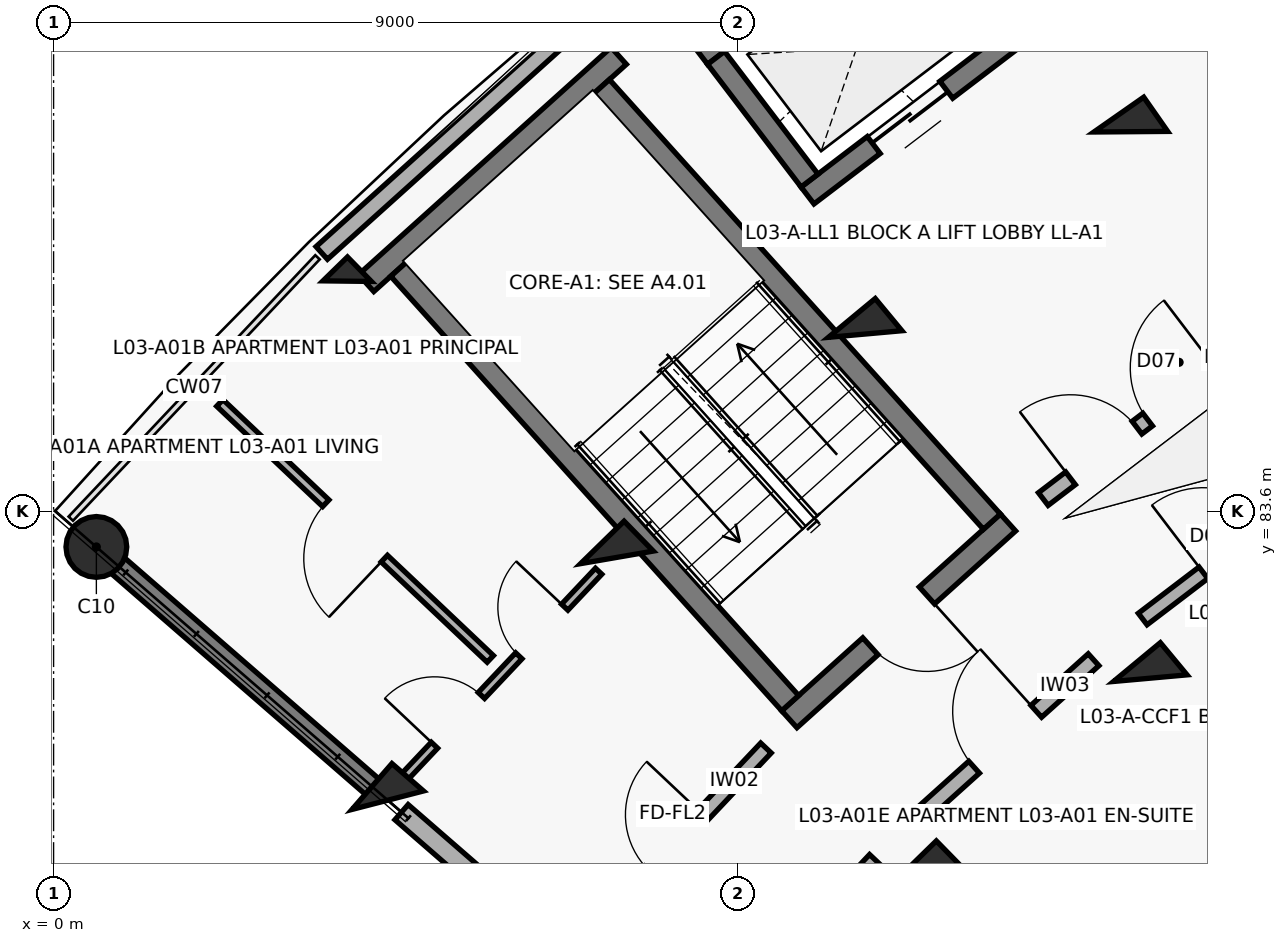
"""IFC4 building model, lengths in metres.
Left out: names, types, materials, properties, quantities, classifications, styles, units other than length and angle.
Written with IfcOpenShell. Run it as: python <this file> out.ifc"""

import sys

from ifc_helpers import new_model, si_unit, direction, frame, frame_2d, origin, origin_2d, place, context, subcontext, project, spatial, rectangle, circle, extrude, element, fill, save


model = new_model("IFC4")
c1 = context("Model", 3, precision=1e-05, world=origin(), true_north=direction((0.0, 1.0)))
c2 = subcontext(c1, "Body", "Model", "MODEL_VIEW")
j1 = project(units=[si_unit("LENGTHUNIT", "METRE"), si_unit("PLANEANGLEUNIT", "RADIAN")], contexts=[c1])
p1 = place(None, origin())
s1 = spatial("IfcSite", under=j1, at=p1, CompositionType="ELEMENT")
p2 = place(p1, origin())
s2 = spatial("IfcBuilding", under=s1, at=p2, CompositionType="ELEMENT")
p3 = place(p2, frame((0.0, 0.0, 11.2)))
s3 = spatial("IfcBuildingStorey", under=s2, at=p3, CompositionType="ELEMENT", Elevation=11.2)
p4 = place(p3, frame((4.397, 79.796, 0.0), z_axis=(0.0, 0.0, 1.0), x_axis=(-0.754709580223, 0.656059028991, 0.0)))
e1 = element("IfcColumn", 1, at=p4, inside=s3, PredefinedType="COLUMN", context=c2, shape_type="SweptSolid", body=[
    extrude(rectangle(XDim=0.55, YDim=0.8, at=origin_2d()), origin(), (0.0, 0.0, 1.0), 3.1),
])
p5 = place(p3, frame((0.563, 83.129, 0.0), z_axis=(0.0, 0.0, 1.0), x_axis=(-0.754709580223, 0.656059028991, 0.0)))
e2 = element("IfcColumn", 2, at=p5, inside=s3, PredefinedType="COLUMN", context=c2, shape_type="SweptSolid", body=[
    extrude(circle(Radius=0.4, at=origin_2d()), origin(), (0.0, 0.0, 1.0), 3.1),
])
for number, where, z_axis, x_axis in (
    (3, (11.52, 78.784, 0.0), (0.0, 0.0, 1.0), (-0.699, 0.715, 0.0)),
    (4, (7.412, 82.991, 0.0), (0.0, 0.0, 1.0), (-0.699, 0.715, 0.0)),
):
    element("IfcColumn", number, at=place(p3, frame(where, z_axis=z_axis, x_axis=x_axis)), inside=s3, PredefinedType="COLUMN", context=c2, shape_type="SweptSolid", body=[
        extrude(rectangle(XDim=0.55, YDim=0.8, at=origin_2d()), origin(), (0.0, 0.0, 1.0), 3.1),
    ])
p6 = place(p3, frame((3.863, 86.626, 0.0), z_axis=(0.0, 0.0, 1.0), x_axis=(-0.698665066769, 0.715448897181, 0.0)))
e5 = element("IfcColumn", 5, at=p6, inside=s3, PredefinedType="COLUMN", context=c2, shape_type="SweptSolid", body=[
    extrude(rectangle(XDim=0.45, YDim=0.45, at=origin_2d()), origin(), (0.0, 0.0, 1.0), 3.1),
])
for number, where, z_axis, x_axis in (
    (6, (14.429, 81.402, 0.0), (0.0, 0.0, 1.0), (-0.638, 0.77, 0.0)),
    (7, (10.678, 85.93, 0.0), (0.0, 0.0, 1.0), (-0.638, 0.77, 0.0)),
):
    element("IfcColumn", number, at=place(p3, frame(where, z_axis=z_axis, x_axis=x_axis)), inside=s3, PredefinedType="COLUMN", context=c2, shape_type="SweptSolid", body=[
        extrude(rectangle(XDim=0.55, YDim=0.8, at=origin_2d()), origin(), (0.0, 0.0, 1.0), 3.1),
    ])
p7 = place(p3, frame((7.437, 89.842, 0.0), z_axis=(0.0, 0.0, 1.0), x_axis=(-0.637961754089, 0.770068049148, 0.0)))
e8 = element("IfcColumn", 8, at=p7, inside=s3, PredefinedType="COLUMN", context=c2, shape_type="SweptSolid", body=[
    extrude(rectangle(XDim=0.5, YDim=0.75, at=origin_2d()), origin(), (0.0, 0.0, 1.0), 3.1),
])
p8 = place(p3, frame((14.172, 88.592, 0.0), z_axis=(0.0, 0.0, 1.0), x_axis=(-0.573004420611, 0.819552276527, 0.0)))
e9 = element("IfcColumn", 9, at=p8, inside=s3, PredefinedType="COLUMN", context=c2, shape_type="SweptSolid", body=[
    extrude(rectangle(XDim=0.55, YDim=0.8, at=origin_2d()), origin(), (0.0, 0.0, 1.0), 3.1),
])
p9 = place(p3, frame((4.261, 79.914, 0.0), z_axis=(0.0, 0.0, 1.0), x_axis=(-0.754703505217, 0.65606601742, 0.0)))
e10 = element("IfcWall", 10, at=p9, inside=s3, PredefinedType="SHEAR", context=c2, shape_type="SweptSolid", body=[
    extrude(rectangle(XDim=4.72, YDim=0.27, at=frame_2d((2.36, 0.0))), origin(), (0.0, 0.0, 1.0), 2.86),
])
p10 = place(p3, frame((3.528, 86.997, 0.0), z_axis=(0.0, 0.0, 1.0), x_axis=(0.743387539862, 0.668860946369, 0.0)))
e11 = element("IfcWall", 11, at=p10, inside=s3, PredefinedType="SOLIDWALL", context=c2, shape_type="SweptSolid", body=[
    extrude(rectangle(XDim=4.809, YDim=0.224, at=frame_2d((2.405, 0.0))), origin(), (0.0, 0.0, 1.0), 2.25),
])
p11 = place(p3, frame((10.766, 74.259, 0.0), z_axis=(0.0, 0.0, 1.0), x_axis=(-0.754717680958, 0.656049710044, 0.0)))
e12 = element("IfcWall", 12, at=p11, inside=s3, PredefinedType="SOLIDWALL", context=c2, shape_type="SweptSolid", body=[
    extrude(rectangle(XDim=8.2, YDim=0.265, at=frame_2d((4.1, 0.0))), origin(), (0.0, 0.0, 1.0), 2.08),
])
p12 = place(p11, frame((3.59, 0.0, 0.75)))
e13 = element("IfcOpeningElement", 13, at=p12, cuts=e12, PredefinedType="OPENING", context=c2, shape_type="SweptSolid", body=[
    extrude(rectangle(XDim=1.35, YDim=1.35, at=frame_2d((0.675, 0.675))), frame((0.0, 0.142, 0.0), z_axis=(0.0, -1.0, 0.0), x_axis=(1.0, 0.0, 0.0)), (0.0, 0.0, 1.0), 0.285),
])
p13 = place(p3, frame((12.557, 83.45, 0.0), z_axis=(0.0, 0.0, 1.0), x_axis=(-0.743375696158, -0.668874109501, 0.0)))
e14 = element("IfcWall", 14, at=p13, inside=s3, PredefinedType="SHEAR", context=c2, shape_type="SweptSolid", body=[
    extrude(rectangle(XDim=3.87, YDim=0.3, at=frame_2d((1.935, 0.0))), origin(), (0.0, 0.0, 1.0), 3.1),
])
p14 = place(p13, frame((1.435, 0.0, 0.0)))
e15 = element("IfcOpeningElement", 15, at=p14, cuts=e14, PredefinedType="OPENING", context=c2, shape_type="SweptSolid", body=[
    extrude(rectangle(XDim=1.0, YDim=2.15, at=frame_2d((0.5, 1.075))), frame((0.0, 0.16, 0.0), z_axis=(0.0, -1.0, 0.0), x_axis=(1.0, 0.0, 0.0)), (0.0, 0.0, 1.0), 0.32),
])
p15 = place(p3, frame((7.436, 89.59, 0.0), z_axis=(0.0, 0.0, 1.0), x_axis=(-0.743400052815, -0.668847038922, 0.0)))
e16 = element("IfcWall", 16, at=p15, inside=s3, PredefinedType="SHEAR", context=c2, shape_type="SweptSolid", body=[
    extrude(rectangle(XDim=4.47, YDim=0.3, at=frame_2d((2.235, 0.0))), origin(), (0.0, 0.0, 1.0), 3.1),
])
p16 = place(p3, frame((12.345, 83.461, 0.0), z_axis=(0.0, 0.0, 1.0), x_axis=(-0.668868253964, 0.743380964808, 0.0)))
e17 = element("IfcWall", 17, at=p16, inside=s3, PredefinedType="SHEAR", context=c2, shape_type="SweptSolid", body=[
    extrude(rectangle(XDim=7.69, YDim=0.3, at=frame_2d((3.845, 0.0))), origin(), (0.0, 0.0, 1.0), 3.1),
])
p17 = place(p3, frame((9.691, 81.073, 0.0), z_axis=(0.0, 0.0, 1.0), x_axis=(-0.668885797871, 0.743365179038, 0.0)))
e18 = element("IfcWall", 18, at=p17, inside=s3, PredefinedType="SHEAR", context=c2, shape_type="SweptSolid", body=[
    extrude(rectangle(XDim=7.69, YDim=0.3, at=frame_2d((3.845, 0.0))), origin(), (0.0, 0.0, 1.0), 3.1),
])
p18 = place(p3, frame((12.616, 89.807, 0.0), z_axis=(0.0, 0.0, 1.0), x_axis=(-0.795474703455, -0.605986795371, 0.0)))
e19 = element("IfcWall", 19, at=p18, inside=s3, PredefinedType="SHEAR", context=c2, shape_type="SweptSolid", body=[
    extrude(rectangle(XDim=3.39, YDim=0.28, at=frame_2d((1.695, 0.0))), origin(), (0.0, 0.0, 1.0), 3.1),
])
p19 = place(p18, frame((1.095, 0.0, 0.0)))
e20 = element("IfcOpeningElement", 20, at=p19, cuts=e19, PredefinedType="OPENING", context=c2, shape_type="SweptSolid", body=[
    extrude(rectangle(XDim=1.2, YDim=2.15, at=frame_2d((0.6, 1.075))), frame((0.0, 0.15, 0.0), z_axis=(0.0, -1.0, 0.0), x_axis=(1.0, 0.0, 0.0)), (0.0, 0.0, 1.0), 0.3),
])
p20 = place(p3, frame((11.216, 91.645, 0.0), z_axis=(0.0, 0.0, 1.0), x_axis=(-0.795439986025, -0.606032365994, 0.0)))
e21 = element("IfcWall", 21, at=p20, inside=s3, PredefinedType="SHEAR", context=c2, shape_type="SweptSolid", body=[
    extrude(rectangle(XDim=3.39, YDim=0.28, at=frame_2d((1.695, 0.0))), origin(), (0.0, 0.0, 1.0), 3.1),
])
p21 = place(p3, frame((9.946, 87.949, 0.0), z_axis=(0.0, 0.0, 1.0), x_axis=(-0.605891019062, 0.795547656033, 0.0)))
e22 = element("IfcWall", 22, at=p21, inside=s3, PredefinedType="SHEAR", context=c2, shape_type="SweptSolid", body=[
    extrude(rectangle(XDim=2.03, YDim=0.28, at=frame_2d((1.015, 0.0))), origin(), (0.0, 0.0, 1.0), 3.1),
])
p22 = place(p3, frame((7.014, 77.984, 0.0), z_axis=(0.0, 0.0, 1.0), x_axis=(0.686310507227, 0.727308660522, 0.0)))
e23 = element("IfcWall", 23, at=p22, inside=s3, PredefinedType="SOLIDWALL", context=c2, shape_type="SweptSolid", body=[
    extrude(rectangle(XDim=3.436, YDim=0.19, at=frame_2d((1.718, 0.0))), origin(), (0.0, 0.0, 1.0), 2.08),
])
p23 = place(p22, frame((1.208, 0.0, 0.0)))
e24 = element("IfcOpeningElement", 24, at=p23, cuts=e23, PredefinedType="OPENING", context=c2, shape_type="SweptSolid", body=[
    extrude(rectangle(XDim=1.02, YDim=2.15, at=frame_2d((0.51, 1.075))), frame((0.0, 0.105, 0.0), z_axis=(0.0, -1.0, 0.0), x_axis=(1.0, 0.0, 0.0)), (0.0, 0.0, 1.0), 0.21),
])
p24 = place(p3, frame((8.561, 76.639, 0.0), z_axis=(0.0, 0.0, 1.0), x_axis=(0.686307658735, 0.727311348434, 0.0)))
e25 = element("IfcWall", 25, at=p24, inside=s3, PredefinedType="SOLIDWALL", context=c2, shape_type="SweptSolid", body=[
    extrude(rectangle(XDim=3.269, YDim=0.19, at=frame_2d((1.634, 0.0))), origin(), (0.0, 0.0, 1.0), 2.08),
])
p25 = place(p24, frame((1.154, 0.0, 0.0)))
e26 = element("IfcOpeningElement", 26, at=p25, cuts=e25, PredefinedType="OPENING", context=c2, shape_type="SweptSolid", body=[
    extrude(rectangle(XDim=0.96, YDim=2.1, at=frame_2d((0.48, 1.05))), frame((0.0, 0.105, 0.0), z_axis=(0.0, -1.0, 0.0), x_axis=(1.0, 0.0, 0.0)), (0.0, 0.0, 1.0), 0.21),
])
p26 = place(p3, frame((4.565, 80.047, 0.0), z_axis=(0.0, 0.0, 1.0), x_axis=(0.686300649561, 0.727317962388, 0.0)))
e27 = element("IfcWall", 27, at=p26, inside=s3, PredefinedType="PARTITIONING", context=c2, shape_type="SweptSolid", body=[
    extrude(rectangle(XDim=3.797, YDim=0.115, at=frame_2d((1.899, 0.0))), origin(), (0.0, 0.0, 1.0), 2.08),
])
p27 = place(p26, frame((0.65, 0.0, 0.0)))
e28 = element("IfcOpeningElement", 28, at=p27, cuts=e27, PredefinedType="OPENING", context=c2, shape_type="SweptSolid", body=[
    extrude(rectangle(XDim=0.9, YDim=2.1, at=frame_2d((0.45, 1.05))), frame((0.0, 0.067, 0.0), z_axis=(0.0, -1.0, 0.0), x_axis=(1.0, 0.0, 0.0)), (0.0, 0.0, 1.0), 0.135),
])
p28 = place(p26, frame((2.267, 0.0, 0.0)))
e29 = element("IfcOpeningElement", 29, at=p28, cuts=e27, PredefinedType="OPENING", context=c2, shape_type="SweptSolid", body=[
    extrude(rectangle(XDim=0.88, YDim=2.1, at=frame_2d((0.44, 1.05))), frame((0.0, 0.067, 0.0), z_axis=(0.0, -1.0, 0.0), x_axis=(1.0, 0.0, 0.0)), (0.0, 0.0, 1.0), 0.135),
])
p29 = place(p3, frame((5.746, 81.655, 0.0), z_axis=(0.0, 0.0, 1.0), x_axis=(-0.726295620759, 0.687382478149, 0.0)))
e30 = element("IfcWall", 30, at=p29, inside=s3, PredefinedType="PARTITIONING", context=c2, shape_type="SweptSolid", body=[
    extrude(rectangle(XDim=4.9, YDim=0.12, at=frame_2d((2.45, 0.0))), origin(), (0.0, 0.0, 1.0), 2.08),
])
p30 = place(p29, frame((1.92, 0.0, 0.0)))
e31 = element("IfcOpeningElement", 31, at=p30, cuts=e30, PredefinedType="OPENING", context=c2, shape_type="SweptSolid", body=[
    extrude(rectangle(XDim=1.06, YDim=2.1, at=frame_2d((0.53, 1.05))), frame((0.0, 0.07, 0.0), z_axis=(0.0, -1.0, 0.0), x_axis=(1.0, 0.0, 0.0)), (0.0, 0.0, 1.0), 0.14),
])
p31 = place(p3, frame((11.357, 79.552, 0.0), z_axis=(0.0, 0.0, 1.0), x_axis=(0.743387266925, 0.668861249718, 0.0)))
e32 = element("IfcWall", 32, at=p31, inside=s3, PredefinedType="SOLIDWALL", context=c2, shape_type="SweptSolid", body=[
    extrude(rectangle(XDim=3.128, YDim=0.21, at=frame_2d((1.564, 0.0))), origin(), (0.0, 0.0, 1.0), 2.08),
])
p32 = place(p31, frame((1.014, 0.0, 0.0)))
e33 = element("IfcOpeningElement", 33, at=p32, cuts=e32, PredefinedType="OPENING", context=c2, shape_type="SweptSolid", body=[
    extrude(rectangle(XDim=1.1, YDim=2.15, at=frame_2d((0.55, 1.075))), frame((0.0, 0.115, 0.0), z_axis=(0.0, -1.0, 0.0), x_axis=(1.0, 0.0, 0.0)), (0.0, 0.0, 1.0), 0.23),
])
p33 = place(p3, frame((13.021, 83.759, 0.0), z_axis=(0.0, 0.0, 1.0), x_axis=(0.795498026433, 0.605956178235, 0.0)))
e34 = element("IfcWall", 34, at=p33, inside=s3, PredefinedType="SOLIDWALL", context=c2, shape_type="SweptSolid", body=[
    extrude(rectangle(XDim=3.296, YDim=0.21, at=frame_2d((1.648, 0.0))), origin(), (0.0, 0.0, 1.0), 2.08),
])
p34 = place(p33, frame((0.45, 0.0, 0.0)))
e35 = element("IfcOpeningElement", 35, at=p34, cuts=e34, PredefinedType="OPENING", context=c2, shape_type="SweptSolid", body=[
    extrude(rectangle(XDim=1.1, YDim=2.15, at=frame_2d((0.55, 1.075))), frame((0.0, 0.115, 0.0), z_axis=(0.0, -1.0, 0.0), x_axis=(1.0, 0.0, 0.0)), (0.0, 0.0, 1.0), 0.23),
])
p35 = place(p33, frame((1.726, 0.0, 0.0)))
e36 = element("IfcOpeningElement", 36, at=p35, cuts=e34, PredefinedType="OPENING", context=c2, shape_type="SweptSolid", body=[
    extrude(rectangle(XDim=1.12, YDim=2.15, at=frame_2d((0.56, 1.075))), frame((0.0, 0.115, 0.0), z_axis=(0.0, -1.0, 0.0), x_axis=(1.0, 0.0, 0.0)), (0.0, 0.0, 1.0), 0.23),
])
p36 = place(p3, frame((14.329, 82.18, 0.0), z_axis=(0.0, 0.0, 1.0), x_axis=(0.795501577908, 0.605951515838, 0.0)))
e37 = element("IfcWall", 37, at=p36, inside=s3, PredefinedType="SOLIDWALL", context=c2, shape_type="SweptSolid", body=[
    extrude(rectangle(XDim=3.129, YDim=0.19, at=frame_2d((1.564, 0.0))), origin(), (0.0, 0.0, 1.0), 2.08),
])
p37 = place(p36, frame((1.004, 0.0, 0.0)))
e38 = element("IfcOpeningElement", 38, at=p37, cuts=e37, PredefinedType="OPENING", context=c2, shape_type="SweptSolid", body=[
    extrude(rectangle(XDim=1.12, YDim=2.15, at=frame_2d((0.56, 1.075))), frame((0.0, 0.105, 0.0), z_axis=(0.0, -1.0, 0.0), x_axis=(1.0, 0.0, 0.0)), (0.0, 0.0, 1.0), 0.21),
])
p38 = place(p3, frame((17.524, 87.288, 0.0), z_axis=(0.0, 0.0, 1.0), x_axis=(-0.540338452216, 0.841447774408, 0.0)))
e39 = element("IfcWall", 39, at=p38, inside=s3, PredefinedType="PARTITIONING", context=c2, shape_type="SweptSolid", body=[
    extrude(rectangle(XDim=7.95, YDim=0.14, at=frame_2d((3.975, 0.0))), origin(), (0.0, 0.0, 1.0), 2.08),
])
p39 = place(p38, frame((6.05, 0.0, 0.0)))
e40 = element("IfcOpeningElement", 40, at=p39, cuts=e39, PredefinedType="OPENING", context=c2, shape_type="SweptSolid", body=[
    extrude(rectangle(XDim=0.92, YDim=2.1, at=frame_2d((0.46, 1.05))), frame((0.0, 0.08, 0.0), z_axis=(0.0, -1.0, 0.0), x_axis=(1.0, 0.0, 0.0)), (0.0, 0.0, 1.0), 0.16),
])
p40 = place(p14, origin())
e41 = element("IfcDoor", 41, at=p40, inside=s3, OperationType="SINGLE_SWING_LEFT", PredefinedType="DOOR", context=c2, shape_type="SweptSolid", body=[
    extrude(rectangle(XDim=1.0, YDim=2.15, at=frame_2d((0.5, 1.075))), frame((0.0, 0.025, 0.0), z_axis=(0.0, -1.0, 0.0), x_axis=(1.0, 0.0, 0.0)), (0.0, 0.0, 1.0), 0.05),
])
fill(e15, e41)
p41 = place(p19, origin())
e42 = element("IfcDoor", 42, at=p41, inside=s3, OperationType="DOUBLE_DOOR_SLIDING", PredefinedType="DOOR", context=c2, shape_type="SweptSolid", body=[
    extrude(rectangle(XDim=1.2, YDim=2.15, at=frame_2d((0.6, 1.075))), frame((0.0, 0.025, 0.0), z_axis=(0.0, -1.0, 0.0), x_axis=(1.0, 0.0, 0.0)), (0.0, 0.0, 1.0), 0.05),
])
fill(e20, e42)
p42 = place(p23, origin())
e43 = element("IfcDoor", 43, at=p42, inside=s3, OperationType="SINGLE_SWING_RIGHT", PredefinedType="DOOR", context=c2, shape_type="SweptSolid", body=[
    extrude(rectangle(XDim=1.02, YDim=2.15, at=frame_2d((0.51, 1.075))), frame((0.0, 0.025, 0.0), z_axis=(0.0, -1.0, 0.0), x_axis=(1.0, 0.0, 0.0)), (0.0, 0.0, 1.0), 0.05),
])
fill(e24, e43)
p43 = place(p27, origin())
e44 = element("IfcDoor", 44, at=p43, inside=s3, OperationType="SINGLE_SWING_LEFT", PredefinedType="DOOR", context=c2, shape_type="SweptSolid", body=[
    extrude(rectangle(XDim=0.9, YDim=2.1, at=frame_2d((0.45, 1.05))), frame((0.0, 0.025, 0.0), z_axis=(0.0, -1.0, 0.0), x_axis=(1.0, 0.0, 0.0)), (0.0, 0.0, 1.0), 0.05),
])
fill(e28, e44)
p44 = place(p28, origin())
e45 = element("IfcDoor", 45, at=p44, inside=s3, OperationType="SINGLE_SWING_RIGHT", PredefinedType="DOOR", context=c2, shape_type="SweptSolid", body=[
    extrude(rectangle(XDim=0.88, YDim=2.1, at=frame_2d((0.44, 1.05))), frame((0.0, 0.025, 0.0), z_axis=(0.0, -1.0, 0.0), x_axis=(1.0, 0.0, 0.0)), (0.0, 0.0, 1.0), 0.05),
])
fill(e29, e45)
p45 = place(p30, origin())
e46 = element("IfcDoor", 46, at=p45, inside=s3, OperationType="SINGLE_SWING_LEFT", PredefinedType="DOOR", context=c2, shape_type="SweptSolid", body=[
    extrude(rectangle(XDim=1.06, YDim=2.1, at=frame_2d((0.53, 1.05))), frame((0.0, 0.025, 0.0), z_axis=(0.0, -1.0, 0.0), x_axis=(1.0, 0.0, 0.0)), (0.0, 0.0, 1.0), 0.05),
])
fill(e31, e46)
p46 = place(p32, origin())
e47 = element("IfcDoor", 47, at=p46, inside=s3, OperationType="SINGLE_SWING_RIGHT", PredefinedType="DOOR", context=c2, shape_type="SweptSolid", body=[
    extrude(rectangle(XDim=1.1, YDim=2.15, at=frame_2d((0.55, 1.075))), frame((0.0, 0.025, 0.0), z_axis=(0.0, -1.0, 0.0), x_axis=(1.0, 0.0, 0.0)), (0.0, 0.0, 1.0), 0.05),
])
fill(e33, e47)
p47 = place(p34, origin())
e48 = element("IfcDoor", 48, at=p47, inside=s3, OperationType="SINGLE_SWING_LEFT", PredefinedType="DOOR", context=c2, shape_type="SweptSolid", body=[
    extrude(rectangle(XDim=1.1, YDim=2.15, at=frame_2d((0.55, 1.075))), frame((0.0, 0.025, 0.0), z_axis=(0.0, -1.0, 0.0), x_axis=(1.0, 0.0, 0.0)), (0.0, 0.0, 1.0), 0.05),
])
fill(e35, e48)
p48 = place(p35, origin())
e49 = element("IfcDoor", 49, at=p48, inside=s3, OperationType="SINGLE_SWING_RIGHT", PredefinedType="DOOR", context=c2, shape_type="SweptSolid", body=[
    extrude(rectangle(XDim=1.12, YDim=2.15, at=frame_2d((0.56, 1.075))), frame((0.0, 0.025, 0.0), z_axis=(0.0, -1.0, 0.0), x_axis=(1.0, 0.0, 0.0)), (0.0, 0.0, 1.0), 0.05),
])
fill(e36, e49)
p49 = place(p37, origin())
e50 = element("IfcDoor", 50, at=p49, inside=s3, OperationType="SINGLE_SWING_LEFT", PredefinedType="DOOR", context=c2, shape_type="SweptSolid", body=[
    extrude(rectangle(XDim=1.12, YDim=2.15, at=frame_2d((0.56, 1.075))), frame((0.0, 0.025, 0.0), z_axis=(0.0, -1.0, 0.0), x_axis=(1.0, 0.0, 0.0)), (0.0, 0.0, 1.0), 0.05),
])
fill(e38, e50)
save(model, sys.argv[1])
